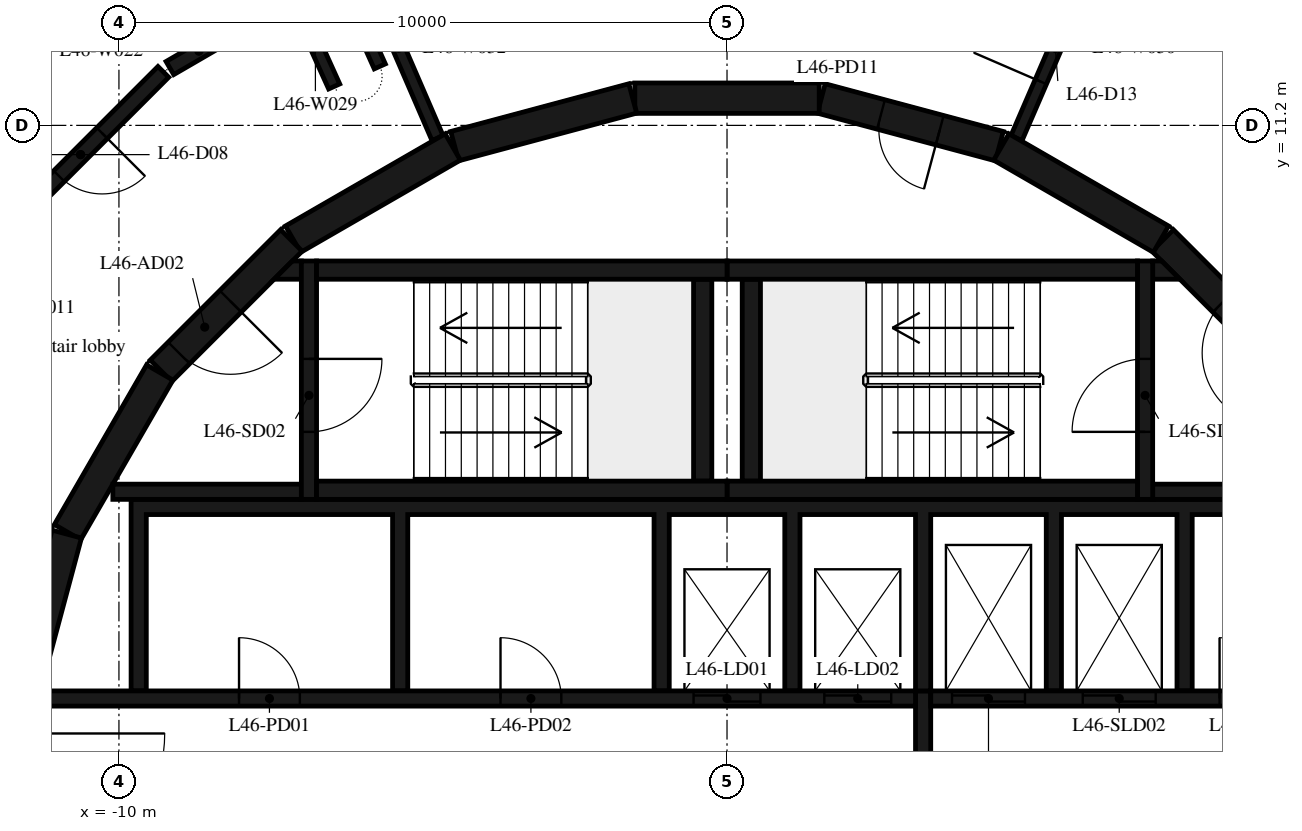
"""IFC4 building model, lengths in metres.
Left out: names, types, materials, properties, quantities, classifications, styles, units other than length and angle.
Written with IfcOpenShell. Run it as: python <this file> out.ifc"""

import sys

from ifc_helpers import new_model, si_unit, direction, frame, frame_2d, origin, place, context, subcontext, project, spatial, polyline, rectangle, outline, extrude, element, fill, save


model = new_model("IFC4")
c1 = context("Model", 3, precision=1e-05, world=origin(), true_north=direction((0.0, 1.0)))
c2 = subcontext(c1, "Body", "Model", "MODEL_VIEW")
j1 = project(units=[si_unit("LENGTHUNIT", "METRE"), si_unit("PLANEANGLEUNIT", "RADIAN")], contexts=[c1])
p1 = place(None, origin())
s1 = spatial("IfcSite", under=j1, at=p1, CompositionType="ELEMENT")
p2 = place(p1, origin())
s2 = spatial("IfcBuilding", under=s1, at=p2, CompositionType="ELEMENT")
p3 = place(p2, frame((0.0, 0.0, 183.2)))
s3 = spatial("IfcBuildingStorey", under=s2, at=p3, CompositionType="ELEMENT", Elevation=183.2)
p4 = place(p3, frame((9.308, 7.164, 0.0), z_axis=(0.0, 0.0, 1.0), x_axis=(-0.707106781187, 0.707106781187, 0.0)))
e1 = element("IfcWall", 1, at=p4, inside=s3, PredefinedType="SHEAR", context=c2, shape_type="SweptSolid", body=[
    extrude(rectangle(XDim=3.032, YDim=0.5, at=frame_2d((1.516, 0.0))), origin(), (0.0, 0.0, 1.0), 4.75),
])
p5 = place(p4, frame((0.416, 0.0, 0.0)))
e2 = element("IfcOpeningElement", 2, at=p5, cuts=e1, PredefinedType="OPENING", context=c2, shape_type="SweptSolid", body=[
    extrude(rectangle(XDim=1.2, YDim=2.1, at=frame_2d((0.6, 1.05))), frame((0.0, 0.26, 0.0), z_axis=(0.0, -1.0, 0.0), x_axis=(1.0, 0.0, 0.0)), (0.0, 0.0, 1.0), 0.52),
])
p6 = place(p3, frame((7.137, 9.329, 0.0), z_axis=(0.0, 0.0, 1.0), x_axis=(-0.865975092491, 0.500087131594, 0.0)))
e3 = element("IfcWall", 3, at=p6, inside=s3, PredefinedType="SHEAR", context=c2, shape_type="SweptSolid", body=[
    extrude(rectangle(XDim=3.033, YDim=0.5, at=frame_2d((1.516, 0.0))), origin(), (0.0, 0.0, 1.0), 4.75),
])
p7 = place(p3, frame((4.479, 10.858, 0.0), z_axis=(0.0, 0.0, 1.0), x_axis=(-0.965948410781, 0.258734743916, 0.0)))
e4 = element("IfcWall", 4, at=p7, inside=s3, PredefinedType="SHEAR", context=c2, shape_type="SweptSolid", body=[
    extrude(rectangle(XDim=3.033, YDim=0.5, at=frame_2d((1.516, 0.0))), origin(), (0.0, 0.0, 1.0), 4.75),
])
p8 = place(p7, frame((1.016, 0.0, 0.0)))
e5 = element("IfcOpeningElement", 5, at=p8, cuts=e4, PredefinedType="OPENING", context=c2, shape_type="SweptSolid", body=[
    extrude(rectangle(XDim=1.0, YDim=2.4, at=frame_2d((0.5, 1.2))), frame((0.0, 0.26, 0.0), z_axis=(0.0, -1.0, 0.0), x_axis=(1.0, 0.0, 0.0)), (0.0, 0.0, 1.0), 0.52),
])
for number, where, z_axis, x_axis in (
    (6, (1.516, 11.647, 0.0), (0.0, 0.0, 1.0), (-1.0, 0.0, 0.0)),
    (7, (-1.55, 11.643, 0.0), (0.0, 0.0, 1.0), (-0.966, -0.259, 0.0)),
    (8, (-4.51, 10.845, 0.0), (0.0, 0.0, 1.0), (-0.866, -0.5, 0.0)),
):
    element("IfcWall", number, at=place(p3, frame(where, z_axis=z_axis, x_axis=x_axis)), inside=s3, PredefinedType="SHEAR", context=c2, shape_type="SweptSolid", body=[
        extrude(rectangle(XDim=3.033, YDim=0.5, at=frame_2d((1.516, 0.0))), origin(), (0.0, 0.0, 1.0), 4.75),
    ])
p9 = place(p3, frame((-7.164, 9.308, 0.0), z_axis=(0.0, 0.0, 1.0), x_axis=(-0.707106781187, -0.707106781187, 0.0)))
e9 = element("IfcWall", 9, at=p9, inside=s3, PredefinedType="SHEAR", context=c2, shape_type="SweptSolid", body=[
    extrude(rectangle(XDim=3.032, YDim=0.5, at=frame_2d((1.516, 0.0))), origin(), (0.0, 0.0, 1.0), 4.75),
])
p10 = place(p9, frame((1.416, 0.0, 0.0)))
e10 = element("IfcOpeningElement", 10, at=p10, cuts=e9, PredefinedType="OPENING", context=c2, shape_type="SweptSolid", body=[
    extrude(rectangle(XDim=1.2, YDim=2.1, at=frame_2d((0.6, 1.05))), frame((0.0, 0.26, 0.0), z_axis=(0.0, -1.0, 0.0), x_axis=(1.0, 0.0, 0.0)), (0.0, 0.0, 1.0), 0.52),
])
for number, where, z_axis, x_axis in (
    (11, (-9.329, 7.137, 0.0), (0.0, 0.0, 1.0), (-0.5, -0.866, 0.0)),
    (12, (-10.858, 4.479, 0.0), (0.0, 0.0, 1.0), (-0.259, -0.966, 0.0)),
):
    element("IfcWall", number, at=place(p3, frame(where, z_axis=z_axis, x_axis=x_axis)), inside=s3, PredefinedType="SHEAR", context=c2, shape_type="SweptSolid", body=[
        extrude(rectangle(XDim=3.033, YDim=0.5, at=frame_2d((1.516, 0.0))), origin(), (0.0, 0.0, 1.0), 4.75),
    ])
for number, where, z_axis, x_axis in (
    (13, (0.0, 5.2, 0.0), (0.0, 0.0, 1.0), (1.0, 0.0, 0.0)),
    (14, (0.0, 8.82, 0.0), (0.0, 0.0, 1.0), (1.0, 0.0, 0.0)),
):
    element("IfcWall", number, at=place(p3, frame(where, z_axis=z_axis, x_axis=x_axis)), inside=s3, PredefinedType="SHEAR", context=c2, shape_type="SweptSolid", body=[
        extrude(rectangle(XDim=6.75, YDim=0.3, at=frame_2d((3.375, 0.0))), origin(), (0.0, 0.0, 1.0), 4.75),
    ])
p11 = place(p3, frame((0.4, 5.35, 0.0), z_axis=(0.0, 0.0, 1.0), x_axis=(0.0, 1.0, 0.0)))
e15 = element("IfcWall", 15, at=p11, inside=s3, PredefinedType="SHEAR", context=c2, shape_type="SweptSolid", body=[
    extrude(rectangle(XDim=3.32, YDim=0.3, at=frame_2d((1.66, 0.0))), origin(), (0.0, 0.0, 1.0), 4.75),
])
p12 = place(p3, frame((6.875, 5.05, 0.0), z_axis=(0.0, 0.0, 1.0), x_axis=(0.0, 1.0, 0.0)))
e16 = element("IfcWall", 16, at=p12, inside=s3, PredefinedType="SHEAR", context=c2, shape_type="SweptSolid", body=[
    extrude(rectangle(XDim=3.92, YDim=0.25, at=frame_2d((1.96, 0.0))), origin(), (0.0, 0.0, 1.0), 4.75),
])
p13 = place(p12, frame((1.11, 0.0, 0.0)))
e17 = element("IfcOpeningElement", 17, at=p13, cuts=e16, PredefinedType="OPENING", context=c2, shape_type="SweptSolid", body=[
    extrude(rectangle(XDim=1.2, YDim=2.1, at=frame_2d((0.6, 1.05))), frame((0.0, 0.135, 0.0), z_axis=(0.0, -1.0, 0.0), x_axis=(1.0, 0.0, 0.0)), (0.0, 0.0, 1.0), 0.27),
])
p14 = place(p3, frame((7.0, 5.175, 0.0), z_axis=(0.0, 0.0, 1.0), x_axis=(1.0, 0.0, 0.0)))
e18 = element("IfcWall", 18, at=p14, inside=s3, PredefinedType="SHEAR", context=c2, shape_type="SweptSolid", body=[
    extrude(rectangle(XDim=3.1, YDim=0.25, at=frame_2d((1.55, 0.0))), origin(), (0.0, 0.0, 1.0), 4.75),
])
p15 = place(p3, origin())
e19 = element("IfcWall", 19, at=p15, inside=s3, PredefinedType="SHEAR", context=c2, shape_type="SweptSolid", body=[
    extrude(outline(polyline([(7.448, 8.67), (7.0, 8.67), (7.0, 8.97), (7.148, 8.97), (7.448, 8.67)])), origin(), (0.0, 0.0, 1.0), 4.75),
])
for number, where, z_axis, x_axis in (
    (20, (-6.75, 5.2, 0.0), (0.0, 0.0, 1.0), (1.0, 0.0, 0.0)),
    (21, (-6.75, 8.82, 0.0), (0.0, 0.0, 1.0), (1.0, 0.0, 0.0)),
):
    element("IfcWall", number, at=place(p3, frame(where, z_axis=z_axis, x_axis=x_axis)), inside=s3, PredefinedType="SHEAR", context=c2, shape_type="SweptSolid", body=[
        extrude(rectangle(XDim=6.75, YDim=0.3, at=frame_2d((3.375, 0.0))), origin(), (0.0, 0.0, 1.0), 4.75),
    ])
p16 = place(p3, frame((-0.4, 5.35, 0.0), z_axis=(0.0, 0.0, 1.0), x_axis=(0.0, 1.0, 0.0)))
e22 = element("IfcWall", 22, at=p16, inside=s3, PredefinedType="SHEAR", context=c2, shape_type="SweptSolid", body=[
    extrude(rectangle(XDim=3.32, YDim=0.3, at=frame_2d((1.66, 0.0))), origin(), (0.0, 0.0, 1.0), 4.75),
])
p17 = place(p3, frame((-6.875, 8.97, 0.0), z_axis=(0.0, 0.0, 1.0), x_axis=(0.0, -1.0, 0.0)))
e23 = element("IfcWall", 23, at=p17, inside=s3, PredefinedType="SHEAR", context=c2, shape_type="SweptSolid", body=[
    extrude(rectangle(XDim=3.92, YDim=0.25, at=frame_2d((1.96, 0.0))), origin(), (0.0, 0.0, 1.0), 4.75),
])
p18 = place(p17, frame((1.61, 0.0, 0.0)))
e24 = element("IfcOpeningElement", 24, at=p18, cuts=e23, PredefinedType="OPENING", context=c2, shape_type="SweptSolid", body=[
    extrude(rectangle(XDim=1.2, YDim=2.1, at=frame_2d((0.6, 1.05))), frame((0.0, 0.135, 0.0), z_axis=(0.0, -1.0, 0.0), x_axis=(1.0, 0.0, 0.0)), (0.0, 0.0, 1.0), 0.27),
])
p19 = place(p3, frame((-7.0, 5.175, 0.0), z_axis=(0.0, 0.0, 1.0), x_axis=(-1.0, 0.0, 0.0)))
e25 = element("IfcWall", 25, at=p19, inside=s3, PredefinedType="SHEAR", context=c2, shape_type="SweptSolid", body=[
    extrude(rectangle(XDim=3.1, YDim=0.25, at=frame_2d((1.55, 0.0))), origin(), (0.0, 0.0, 1.0), 4.75),
])
p20 = place(p3, origin())
e26 = element("IfcWall", 26, at=p20, inside=s3, PredefinedType="SHEAR", context=c2, shape_type="SweptSolid", body=[
    extrude(outline(polyline([(-7.148, 8.97), (-7.0, 8.97), (-7.0, 8.67), (-7.448, 8.67), (-7.148, 8.97)])), origin(), (0.0, 0.0, 1.0), 4.75),
])
p21 = place(p3, origin())
e27 = element("IfcWall", 27, at=p21, inside=s3, PredefinedType="SHEAR", context=c2, shape_type="SweptSolid", body=[
    extrude(outline(polyline([(-9.55, 4.8), (-5.5, 4.8), (-5.5, 1.9), (-5.25, 1.9), (-5.25, 4.8), (-1.2, 4.8), (-1.2, 1.9), (-0.95, 1.9), (-0.95, 4.8), (0.95, 4.8), (0.95, 1.9), (1.2, 1.9), (1.2, 4.8), (3.1, 4.8), (3.1, 1.9), (3.35, 1.9), (3.35, 4.8), (5.25, 4.8), (5.25, 1.9), (5.5, 1.9), (5.5, 4.8), (7.4, 4.8), (7.4, 1.9), (7.65, 1.9), (7.65, 4.8), (9.55, 4.8), (9.55, 1.9), (9.8, 1.9), (9.8, 4.8), (9.8, 5.05), (-9.8, 5.05), (-9.8, 4.8), (-9.8, 1.9), (-9.55, 1.9), (-9.55, 4.8)])), origin(), (0.0, 0.0, 1.0), 4.75),
])
p22 = place(p3, frame((-11.28, 1.775, 0.0), z_axis=(0.0, 0.0, 1.0), x_axis=(1.0, 0.0, 0.0)))
e28 = element("IfcWall", 28, at=p22, inside=s3, PredefinedType="SHEAR", context=c2, shape_type="SweptSolid", body=[
    extrude(rectangle(XDim=14.38, YDim=0.25, at=frame_2d((7.19, 0.0))), origin(), (0.0, 0.0, 1.0), 4.75),
])
p23 = place(p22, frame((10.73, 0.0, 0.0)))
e29 = element("IfcOpeningElement", 29, at=p23, cuts=e28, PredefinedType="OPENING", context=c2, shape_type="SweptSolid", body=[
    extrude(rectangle(XDim=1.1, YDim=2.1, at=frame_2d((0.55, 1.05))), frame((0.0, 0.135, 0.0), z_axis=(0.0, -1.0, 0.0), x_axis=(1.0, 0.0, 0.0)), (0.0, 0.0, 1.0), 0.27),
])
p24 = place(p22, frame((12.88, 0.0, 0.0)))
e30 = element("IfcOpeningElement", 30, at=p24, cuts=e28, PredefinedType="OPENING", context=c2, shape_type="SweptSolid", body=[
    extrude(rectangle(XDim=1.1, YDim=2.1, at=frame_2d((0.55, 1.05))), frame((0.0, 0.135, 0.0), z_axis=(0.0, -1.0, 0.0), x_axis=(1.0, 0.0, 0.0)), (0.0, 0.0, 1.0), 0.27),
])
p25 = place(p22, frame((3.255, 0.0, 0.0)))
e31 = element("IfcOpeningElement", 31, at=p25, cuts=e28, PredefinedType="OPENING", context=c2, shape_type="SweptSolid", body=[
    extrude(rectangle(XDim=1.0, YDim=2.4, at=frame_2d((0.5, 1.2))), frame((0.0, 0.135, 0.0), z_axis=(0.0, -1.0, 0.0), x_axis=(1.0, 0.0, 0.0)), (0.0, 0.0, 1.0), 0.27),
])
p26 = place(p22, frame((7.555, 0.0, 0.0)))
e32 = element("IfcOpeningElement", 32, at=p26, cuts=e28, PredefinedType="OPENING", context=c2, shape_type="SweptSolid", body=[
    extrude(rectangle(XDim=1.0, YDim=2.4, at=frame_2d((0.5, 1.2))), frame((0.0, 0.135, 0.0), z_axis=(0.0, -1.0, 0.0), x_axis=(1.0, 0.0, 0.0)), (0.0, 0.0, 1.0), 0.27),
])
p27 = place(p3, frame((3.35, 1.775, 0.0), z_axis=(0.0, 0.0, 1.0), x_axis=(1.0, 0.0, 0.0)))
e33 = element("IfcWall", 33, at=p27, inside=s3, PredefinedType="SHEAR", context=c2, shape_type="SweptSolid", body=[
    extrude(rectangle(XDim=7.93, YDim=0.25, at=frame_2d((3.965, 0.0))), origin(), (0.0, 0.0, 1.0), 4.75),
])
p28 = place(p27, frame((0.35, 0.0, 0.0)))
e34 = element("IfcOpeningElement", 34, at=p28, cuts=e33, PredefinedType="OPENING", context=c2, shape_type="SweptSolid", body=[
    extrude(rectangle(XDim=1.2, YDim=2.4, at=frame_2d((0.6, 1.2))), frame((0.0, 0.135, 0.0), z_axis=(0.0, -1.0, 0.0), x_axis=(1.0, 0.0, 0.0)), (0.0, 0.0, 1.0), 0.27),
])
p29 = place(p27, frame((2.5, 0.0, 0.0)))
e35 = element("IfcOpeningElement", 35, at=p29, cuts=e33, PredefinedType="OPENING", context=c2, shape_type="SweptSolid", body=[
    extrude(rectangle(XDim=1.2, YDim=2.4, at=frame_2d((0.6, 1.2))), frame((0.0, 0.135, 0.0), z_axis=(0.0, -1.0, 0.0), x_axis=(1.0, 0.0, 0.0)), (0.0, 0.0, 1.0), 0.27),
])
p30 = place(p27, frame((4.75, 0.0, 0.0)))
e36 = element("IfcOpeningElement", 36, at=p30, cuts=e33, PredefinedType="OPENING", context=c2, shape_type="SweptSolid", body=[
    extrude(rectangle(XDim=1.0, YDim=2.4, at=frame_2d((0.5, 1.2))), frame((0.0, 0.135, 0.0), z_axis=(0.0, -1.0, 0.0), x_axis=(1.0, 0.0, 0.0)), (0.0, 0.0, 1.0), 0.27),
])
p31 = place(p3, frame((3.225, -1.9, 0.0), z_axis=(0.0, 0.0, 1.0), x_axis=(0.0, 1.0, 0.0)))
e37 = element("IfcWall", 37, at=p31, inside=s3, PredefinedType="SHEAR", context=c2, shape_type="SweptSolid", body=[
    extrude(rectangle(XDim=3.8, YDim=0.25, at=frame_2d((1.9, 0.0))), origin(), (0.0, 0.0, 1.0), 4.75),
])
p32 = place(p3, frame((-9.27, 12.08, 0.0), z_axis=(0.0, 0.0, 1.0), x_axis=(-0.707106781187, -0.707106781187, 0.0)))
e38 = element("IfcWall", 38, at=p32, inside=s3, PredefinedType="PARTITIONING", context=c2, shape_type="SweptSolid", body=[
    extrude(rectangle(XDim=3.849, YDim=0.25, at=frame_2d((1.925, 0.0))), origin(), (0.0, 0.0, 1.0), 4.75),
])
p33 = place(p32, frame((1.425, 0.0, 0.0)))
e39 = element("IfcOpeningElement", 39, at=p33, cuts=e38, PredefinedType="OPENING", context=c2, shape_type="SweptSolid", body=[
    extrude(rectangle(XDim=1.0, YDim=2.1, at=frame_2d((0.5, 1.05))), frame((0.0, 0.135, 0.0), z_axis=(0.0, -1.0, 0.0), x_axis=(1.0, 0.0, 0.0)), (0.0, 0.0, 1.0), 0.27),
])
p34 = place(p3, frame((-8.208, 12.697, 0.0), z_axis=(0.0, 0.0, 1.0), x_axis=(-0.86455637663, -0.502535841138, 0.0)))
e40 = element("IfcWall", 40, at=p34, inside=s3, PredefinedType="PARTITIONING", context=c2, shape_type="SweptSolid", body=[
    extrude(rectangle(XDim=1.103, YDim=0.25, at=frame_2d((0.552, 0.0))), origin(), (0.0, 0.0, 1.0), 4.75),
])
p35 = place(p3, frame((-7.078, 13.206, 0.0), z_axis=(0.0, 0.0, 1.0), x_axis=(0.412428521681, -0.910989963997, 0.0)))
e41 = element("IfcWall", 41, at=p35, inside=s3, PredefinedType="PARTITIONING", context=c2, shape_type="SweptSolid", body=[
    extrude(rectangle(XDim=1.5, YDim=0.2, at=frame_2d((0.75, 0.0))), origin(), (0.0, 0.0, 1.0), 4.75),
])
p36 = place(p3, frame((-6.039, 13.948, 0.0), z_axis=(0.0, 0.0, 1.0), x_axis=(0.396880096663, -0.917870464103, 0.0)))
e42 = element("IfcWall", 42, at=p36, inside=s3, PredefinedType="PARTITIONING", context=c2, shape_type="SweptSolid", body=[
    extrude(rectangle(XDim=3.222, YDim=0.2, at=frame_2d((1.611, 0.0))), origin(), (0.0, 0.0, 1.0), 4.75),
])
p37 = place(p3, frame((-5.71, 12.17, 0.0), z_axis=(0.0, 0.0, 1.0), x_axis=(-0.40942296047, 0.912344693326, 0.0)))
e43 = element("IfcWall", 43, at=p37, inside=s3, PredefinedType="PARTITIONING", context=c2, shape_type="SweptSolid", body=[
    extrude(rectangle(XDim=1.585, YDim=0.2, at=frame_2d((0.792, 0.0))), origin(), (0.0, 0.0, 1.0), 4.75),
])
p38 = place(p3, frame((4.76, 10.99, 0.0), z_axis=(0.0, 0.0, 1.0), x_axis=(0.396905977672, 0.917859272922, 0.0)))
e44 = element("IfcWall", 44, at=p38, inside=s3, PredefinedType="PARTITIONING", context=c2, shape_type="SweptSolid", body=[
    extrude(rectangle(XDim=3.224, YDim=0.2, at=frame_2d((1.612, 0.0))), origin(), (0.0, 0.0, 1.0), 4.75),
])
p39 = place(p38, frame((1.012, 0.0, 0.0)))
e45 = element("IfcOpeningElement", 45, at=p39, cuts=e44, PredefinedType="OPENING", context=c2, shape_type="SweptSolid", body=[
    extrude(rectangle(XDim=1.2, YDim=2.1, at=frame_2d((0.6, 1.05))), frame((0.0, 0.11, 0.0), z_axis=(0.0, -1.0, 0.0), x_axis=(1.0, 0.0, 0.0)), (0.0, 0.0, 1.0), 0.22),
])
p40 = place(p3, frame((9.27, 12.08, 0.0), z_axis=(0.0, 0.0, 1.0), x_axis=(-0.864599561852, 0.502461538474, 0.0)))
e46 = element("IfcWall", 46, at=p40, inside=s3, PredefinedType="PARTITIONING", context=c2, shape_type="SweptSolid", body=[
    extrude(rectangle(XDim=1.228, YDim=0.25, at=frame_2d((0.614, 0.0))), origin(), (0.0, 0.0, 1.0), 4.75),
])
p41 = place(p13, origin())
e47 = element("IfcDoor", 47, at=p41, inside=s3, OperationType="SINGLE_SWING_LEFT", PredefinedType="DOOR", context=c2, shape_type="SweptSolid", body=[
    extrude(rectangle(XDim=1.2, YDim=2.1, at=frame_2d((0.6, 1.05))), frame((0.0, 0.025, 0.0), z_axis=(0.0, -1.0, 0.0), x_axis=(1.0, 0.0, 0.0)), (0.0, 0.0, 1.0), 0.05),
])
fill(e17, e47)
p42 = place(p5, origin())
e48 = element("IfcDoor", 48, at=p42, inside=s3, OperationType="SINGLE_SWING_RIGHT", PredefinedType="DOOR", context=c2, shape_type="SweptSolid", body=[
    extrude(rectangle(XDim=1.2, YDim=2.1, at=frame_2d((0.6, 1.05))), frame((0.0, 0.025, 0.0), z_axis=(0.0, -1.0, 0.0), x_axis=(1.0, 0.0, 0.0)), (0.0, 0.0, 1.0), 0.05),
])
fill(e2, e48)
p43 = place(p18, origin())
e49 = element("IfcDoor", 49, at=p43, inside=s3, OperationType="SINGLE_SWING_LEFT", PredefinedType="DOOR", context=c2, shape_type="SweptSolid", body=[
    extrude(rectangle(XDim=1.2, YDim=2.1, at=frame_2d((0.6, 1.05))), frame((0.0, 0.025, 0.0), z_axis=(0.0, -1.0, 0.0), x_axis=(1.0, 0.0, 0.0)), (0.0, 0.0, 1.0), 0.05),
])
fill(e24, e49)
p44 = place(p10, origin())
e50 = element("IfcDoor", 50, at=p44, inside=s3, OperationType="SINGLE_SWING_RIGHT", PredefinedType="DOOR", context=c2, shape_type="SweptSolid", body=[
    extrude(rectangle(XDim=1.2, YDim=2.1, at=frame_2d((0.6, 1.05))), frame((0.0, 0.025, 0.0), z_axis=(0.0, -1.0, 0.0), x_axis=(1.0, 0.0, 0.0)), (0.0, 0.0, 1.0), 0.05),
])
fill(e10, e50)
p45 = place(p23, origin())
e51 = element("IfcDoor", 51, at=p45, inside=s3, OperationType="DOUBLE_DOOR_SLIDING", PredefinedType="DOOR", context=c2, shape_type="SweptSolid", body=[
    extrude(rectangle(XDim=1.1, YDim=2.1, at=frame_2d((0.55, 1.05))), frame((0.0, 0.025, 0.0), z_axis=(0.0, -1.0, 0.0), x_axis=(1.0, 0.0, 0.0)), (0.0, 0.0, 1.0), 0.05),
])
fill(e29, e51)
p46 = place(p24, origin())
e52 = element("IfcDoor", 52, at=p46, inside=s3, OperationType="DOUBLE_DOOR_SLIDING", PredefinedType="DOOR", context=c2, shape_type="SweptSolid", body=[
    extrude(rectangle(XDim=1.1, YDim=2.1, at=frame_2d((0.55, 1.05))), frame((0.0, 0.025, 0.0), z_axis=(0.0, -1.0, 0.0), x_axis=(1.0, 0.0, 0.0)), (0.0, 0.0, 1.0), 0.05),
])
fill(e30, e52)
p47 = place(p28, origin())
e53 = element("IfcDoor", 53, at=p47, inside=s3, OperationType="DOUBLE_DOOR_SLIDING", PredefinedType="DOOR", context=c2, shape_type="SweptSolid", body=[
    extrude(rectangle(XDim=1.2, YDim=2.4, at=frame_2d((0.6, 1.2))), frame((0.0, 0.025, 0.0), z_axis=(0.0, -1.0, 0.0), x_axis=(1.0, 0.0, 0.0)), (0.0, 0.0, 1.0), 0.05),
])
fill(e34, e53)
p48 = place(p29, origin())
e54 = element("IfcDoor", 54, at=p48, inside=s3, OperationType="DOUBLE_DOOR_SLIDING", PredefinedType="DOOR", context=c2, shape_type="SweptSolid", body=[
    extrude(rectangle(XDim=1.2, YDim=2.4, at=frame_2d((0.6, 1.2))), frame((0.0, 0.025, 0.0), z_axis=(0.0, -1.0, 0.0), x_axis=(1.0, 0.0, 0.0)), (0.0, 0.0, 1.0), 0.05),
])
fill(e35, e54)
p49 = place(p25, origin())
e55 = element("IfcDoor", 55, at=p49, inside=s3, OperationType="SINGLE_SWING_LEFT", PredefinedType="DOOR", context=c2, shape_type="SweptSolid", body=[
    extrude(rectangle(XDim=1.0, YDim=2.4, at=frame_2d((0.5, 1.2))), frame((0.0, 0.025, 0.0), z_axis=(0.0, -1.0, 0.0), x_axis=(1.0, 0.0, 0.0)), (0.0, 0.0, 1.0), 0.05),
])
fill(e31, e55)
p50 = place(p26, origin())
e56 = element("IfcDoor", 56, at=p50, inside=s3, OperationType="SINGLE_SWING_RIGHT", PredefinedType="DOOR", context=c2, shape_type="SweptSolid", body=[
    extrude(rectangle(XDim=1.0, YDim=2.4, at=frame_2d((0.5, 1.2))), frame((0.0, 0.025, 0.0), z_axis=(0.0, -1.0, 0.0), x_axis=(1.0, 0.0, 0.0)), (0.0, 0.0, 1.0), 0.05),
])
fill(e32, e56)
p51 = place(p30, origin())
e57 = element("IfcDoor", 57, at=p51, inside=s3, OperationType="SINGLE_SWING_LEFT", PredefinedType="DOOR", context=c2, shape_type="SweptSolid", body=[
    extrude(rectangle(XDim=1.0, YDim=2.4, at=frame_2d((0.5, 1.2))), frame((0.0, 0.025, 0.0), z_axis=(0.0, -1.0, 0.0), x_axis=(1.0, 0.0, 0.0)), (0.0, 0.0, 1.0), 0.05),
])
fill(e36, e57)
p52 = place(p8, origin())
e58 = element("IfcDoor", 58, at=p52, inside=s3, OperationType="SINGLE_SWING_LEFT", PredefinedType="DOOR", context=c2, shape_type="SweptSolid", body=[
    extrude(rectangle(XDim=1.0, YDim=2.4, at=frame_2d((0.5, 1.2))), frame((0.0, 0.025, 0.0), z_axis=(0.0, -1.0, 0.0), x_axis=(1.0, 0.0, 0.0)), (0.0, 0.0, 1.0), 0.05),
])
fill(e5, e58)
p53 = place(p33, origin())
e59 = element("IfcDoor", 59, at=p53, inside=s3, OperationType="SINGLE_SWING_LEFT", PredefinedType="DOOR", context=c2, shape_type="SweptSolid", body=[
    extrude(rectangle(XDim=1.0, YDim=2.1, at=frame_2d((0.5, 1.05))), frame((0.0, 0.025, 0.0), z_axis=(0.0, -1.0, 0.0), x_axis=(1.0, 0.0, 0.0)), (0.0, 0.0, 1.0), 0.05),
])
fill(e39, e59)
p54 = place(p39, origin())
e60 = element("IfcDoor", 60, at=p54, inside=s3, OperationType="SINGLE_SWING_LEFT", PredefinedType="DOOR", context=c2, shape_type="SweptSolid", body=[
    extrude(rectangle(XDim=1.2, YDim=2.1, at=frame_2d((0.6, 1.05))), frame((0.0, 0.025, 0.0), z_axis=(0.0, -1.0, 0.0), x_axis=(1.0, 0.0, 0.0)), (0.0, 0.0, 1.0), 0.05),
])
fill(e45, e60)
save(model, sys.argv[1])
